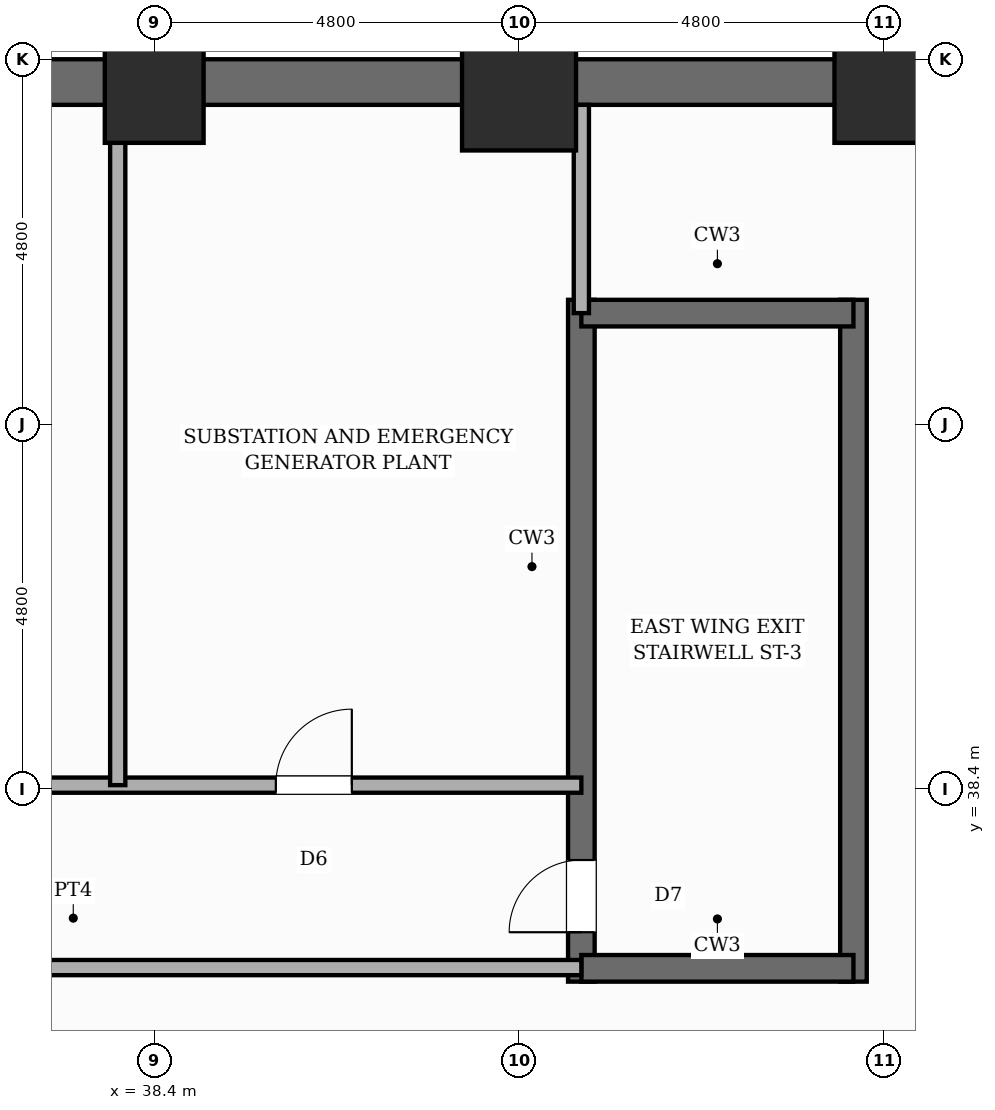
"""IFC4 building model, lengths in metres.
Left out: names, types, materials, properties, quantities, classifications, styles, units other than length and angle.
Written with IfcOpenShell. Run it as: python <this file> out.ifc"""

import sys

from ifc_helpers import new_model, si_unit, direction, frame, frame_2d, origin, origin_2d, place, context, subcontext, project, spatial, rectangle, extrude, element, fill, save


model = new_model("IFC4")
c1 = context("Model", 3, precision=1e-05, world=origin(), true_north=direction((0.0, 1.0)))
c2 = subcontext(c1, "Body", "Model", "MODEL_VIEW")
j1 = project(units=[si_unit("LENGTHUNIT", "METRE"), si_unit("PLANEANGLEUNIT", "RADIAN")], contexts=[c1])
p1 = place(None, origin())
s1 = spatial("IfcSite", under=j1, at=p1, CompositionType="ELEMENT")
p2 = place(p1, origin())
s2 = spatial("IfcBuilding", under=s1, at=p2, CompositionType="ELEMENT")
p3 = place(p2, frame((0.0, 0.0, -4.4)))
s3 = spatial("IfcBuildingStorey", under=s2, at=p3, CompositionType="ELEMENT", Elevation=-4.4)
p4 = place(p3, frame((62.1, 47.7, 0.0), z_axis=(0.0, 0.0, 1.0), x_axis=(-1.0, 0.0, 0.0)))
e1 = element("IfcWall", 1, at=p4, inside=s3, PredefinedType="USERDEFINED", context=c2, shape_type="SweptSolid", body=[
    extrude(rectangle(XDim=61.8, YDim=0.6, at=frame_2d((30.9, 0.0))), origin(), (0.0, 0.0, 1.0), 4.4),
])
p5 = place(p3, frame((44.02, 35.865, 0.0), z_axis=(0.0, 0.0, 1.0), x_axis=(0.0, 1.0, 0.0)))
e2 = element("IfcWall", 2, at=p5, inside=s3, PredefinedType="SHEAR", context=c2, shape_type="SweptSolid", body=[
    extrude(rectangle(XDim=8.97, YDim=0.35, at=frame_2d((4.485, 0.0))), origin(), (0.0, 0.0, 1.0), 4.4),
])
p6 = place(p5, frame((0.65, 0.0, 0.0)))
e3 = element("IfcOpeningElement", 3, at=p6, cuts=e2, PredefinedType="OPENING", context=c2, shape_type="SweptSolid", body=[
    extrude(rectangle(XDim=0.95, YDim=2.1, at=frame_2d((0.475, 1.05))), frame((0.0, 0.185, 0.0), z_axis=(0.0, -1.0, 0.0), x_axis=(1.0, 0.0, 0.0)), (0.0, 0.0, 1.0), 0.37),
])
p7 = place(p3, frame((47.6, 35.865, 0.0), z_axis=(0.0, 0.0, 1.0), x_axis=(0.0, 1.0, 0.0)))
e4 = element("IfcWall", 4, at=p7, inside=s3, PredefinedType="SHEAR", context=c2, shape_type="SweptSolid", body=[
    extrude(rectangle(XDim=8.97, YDim=0.35, at=frame_2d((4.485, 0.0))), origin(), (0.0, 0.0, 1.0), 4.4),
])
for number, where, z_axis, x_axis in (
    (5, (44.02, 36.04, 0.0), (0.0, 0.0, 1.0), (1.0, 0.0, 0.0)),
    (6, (44.02, 44.66, 0.0), (0.0, 0.0, 1.0), (1.0, 0.0, 0.0)),
):
    element("IfcWall", number, at=place(p3, frame(where, z_axis=z_axis, x_axis=x_axis)), inside=s3, PredefinedType="SHEAR", context=c2, shape_type="SweptSolid", body=[
        extrude(rectangle(XDim=3.58, YDim=0.35, at=frame_2d((1.79, 0.0))), origin(), (0.0, 0.0, 1.0), 4.4),
    ])
p8 = place(p3, frame((38.4, 47.55, 0.0), z_axis=(0.0, 0.0, 1.0), x_axis=(1.0, 0.0, 0.0)))
e7 = element("IfcColumn", 7, at=p8, inside=s3, PredefinedType="COLUMN", context=c2, shape_type="SweptSolid", body=[
    extrude(rectangle(XDim=1.3, YDim=1.3, at=origin_2d()), origin(), (0.0, 0.0, 1.0), 4.4),
])
p9 = place(p3, frame((43.2, 47.55, 0.0), z_axis=(0.0, 0.0, 1.0), x_axis=(1.0, 0.0, 0.0)))
e8 = element("IfcColumn", 8, at=p9, inside=s3, PredefinedType="USERDEFINED", context=c2, shape_type="SweptSolid", body=[
    extrude(rectangle(XDim=1.5, YDim=1.5, at=origin_2d()), origin(), (0.0, 0.0, 1.0), 4.4),
])
p10 = place(p3, frame((48.0, 47.55, 0.0), z_axis=(0.0, 0.0, 1.0), x_axis=(1.0, 0.0, 0.0)))
e9 = element("IfcColumn", 9, at=p10, inside=s3, PredefinedType="COLUMN", context=c2, shape_type="SweptSolid", body=[
    extrude(rectangle(XDim=1.3, YDim=1.3, at=origin_2d()), origin(), (0.0, 0.0, 1.0), 4.4),
])
p11 = place(p3, frame((25.1, 36.05, 0.0), z_axis=(0.0, 0.0, 1.0), x_axis=(1.0, 0.0, 0.0)))
e10 = element("IfcWall", 10, at=p11, inside=s3, PredefinedType="PARTITIONING", context=c2, shape_type="SweptSolid", body=[
    extrude(rectangle(XDim=18.92, YDim=0.2, at=frame_2d((9.46, 0.0))), origin(), (0.0, 0.0, 1.0), 4.05),
])
p12 = place(p11, frame((4.2, 0.0, 0.0)))
e11 = element("IfcOpeningElement", 11, at=p12, cuts=e10, PredefinedType="OPENING", context=c2, shape_type="SweptSolid", body=[
    extrude(rectangle(XDim=1.0, YDim=2.15, at=frame_2d((0.5, 1.075))), frame((0.0, 0.11, 0.0), z_axis=(0.0, -1.0, 0.0), x_axis=(1.0, 0.0, 0.0)), (0.0, 0.0, 1.0), 0.22),
])
p13 = place(p3, frame((25.1, 38.45, 0.0), z_axis=(0.0, 0.0, 1.0), x_axis=(1.0, 0.0, 0.0)))
e12 = element("IfcWall", 12, at=p13, inside=s3, PredefinedType="PARTITIONING", context=c2, shape_type="SweptSolid", body=[
    extrude(rectangle(XDim=18.92, YDim=0.2, at=frame_2d((9.46, 0.0))), origin(), (0.0, 0.0, 1.0), 4.05),
])
p14 = place(p13, frame((5.2, 0.0, 0.0)))
e13 = element("IfcOpeningElement", 13, at=p14, cuts=e12, PredefinedType="OPENING", context=c2, shape_type="SweptSolid", body=[
    extrude(rectangle(XDim=1.0, YDim=2.15, at=frame_2d((0.5, 1.075))), frame((0.0, 0.11, 0.0), z_axis=(0.0, -1.0, 0.0), x_axis=(1.0, 0.0, 0.0)), (0.0, 0.0, 1.0), 0.22),
])
p15 = place(p13, frame((14.9, 0.0, 0.0)))
e14 = element("IfcOpeningElement", 14, at=p15, cuts=e12, PredefinedType="OPENING", context=c2, shape_type="SweptSolid", body=[
    extrude(rectangle(XDim=1.0, YDim=2.15, at=frame_2d((0.5, 1.075))), frame((0.0, 0.11, 0.0), z_axis=(0.0, -1.0, 0.0), x_axis=(1.0, 0.0, 0.0)), (0.0, 0.0, 1.0), 0.22),
])
p16 = place(p3, frame((37.92, 38.45, 0.0), z_axis=(0.0, 0.0, 1.0), x_axis=(0.0, 1.0, 0.0)))
e15 = element("IfcWall", 15, at=p16, inside=s3, PredefinedType="PARTITIONING", context=c2, shape_type="SweptSolid", body=[
    extrude(rectangle(XDim=8.95, YDim=0.2, at=frame_2d((4.475, 0.0))), origin(), (0.0, 0.0, 1.0), 3.28),
])
p17 = place(p3, frame((44.02, 44.66, 0.0), z_axis=(0.0, 0.0, 1.0), x_axis=(0.0, 1.0, 0.0)))
e16 = element("IfcWall", 16, at=p17, inside=s3, PredefinedType="PARTITIONING", context=c2, shape_type="SweptSolid", body=[
    extrude(rectangle(XDim=2.74, YDim=0.2, at=frame_2d((1.37, 0.0))), origin(), (0.0, 0.0, 1.0), 4.05),
])
p18 = place(p6, origin())
e17 = element("IfcDoor", 17, at=p18, inside=s3, OperationType="SINGLE_SWING_LEFT", PredefinedType="DOOR", context=c2, shape_type="SweptSolid", body=[
    extrude(rectangle(XDim=0.95, YDim=2.1, at=frame_2d((0.475, 1.05))), frame((0.0, 0.025, 0.0), z_axis=(0.0, -1.0, 0.0), x_axis=(1.0, 0.0, 0.0)), (0.0, 0.0, 1.0), 0.05),
])
fill(e3, e17)
p19 = place(p15, origin())
e18 = element("IfcDoor", 18, at=p19, inside=s3, OperationType="SINGLE_SWING_RIGHT", PredefinedType="DOOR", context=c2, shape_type="SweptSolid", body=[
    extrude(rectangle(XDim=1.0, YDim=2.15, at=frame_2d((0.5, 1.075))), frame((0.0, 0.025, 0.0), z_axis=(0.0, -1.0, 0.0), x_axis=(1.0, 0.0, 0.0)), (0.0, 0.0, 1.0), 0.05),
])
fill(e14, e18)
save(model, sys.argv[1])
